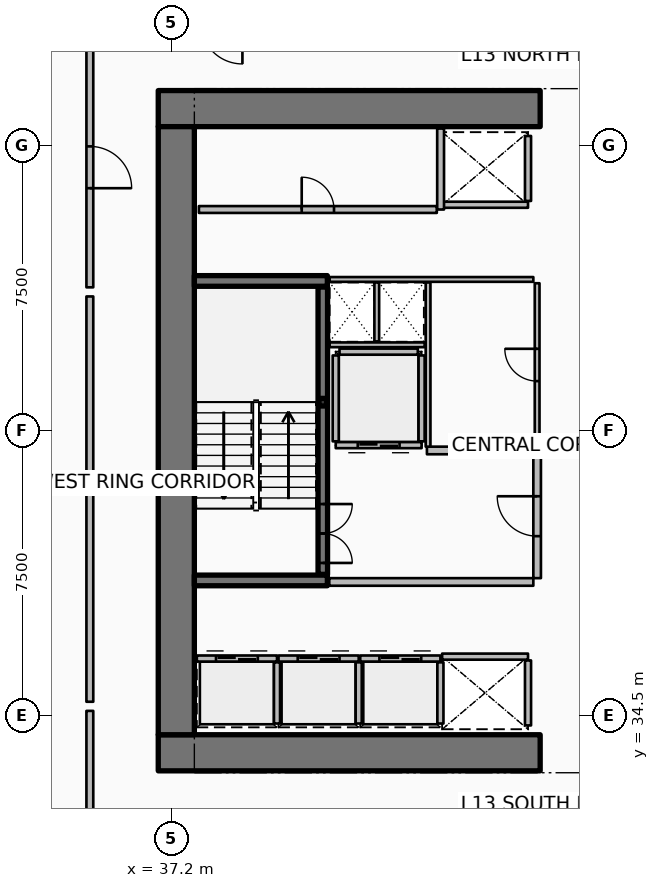
"""IFC4 building model, lengths in metres.
Left out: names, types, materials, properties, quantities, classifications, styles, units other than length and angle.
Written with IfcOpenShell. Run it as: python <this file> out.ifc"""

import sys

from ifc_helpers import new_model, si_unit, direction, frame, frame_2d, origin, origin_2d, place, context, subcontext, project, spatial, rectangle, hollow_rectangle, extrude, element, fill, save


model = new_model("IFC4")
c1 = context("Model", 3, precision=1e-05, world=origin(), true_north=direction((0.0, 1.0)))
c2 = subcontext(c1, "Body", "Model", "MODEL_VIEW")
j1 = project(units=[si_unit("LENGTHUNIT", "METRE"), si_unit("PLANEANGLEUNIT", "RADIAN")], contexts=[c1])
p1 = place(None, origin())
s1 = spatial("IfcSite", under=j1, at=p1, CompositionType="ELEMENT")
p2 = place(p1, origin())
s2 = spatial("IfcBuilding", under=s1, at=p2, CompositionType="ELEMENT")
p3 = place(p2, frame((0.0, 0.0, 56.4)))
s3 = spatial("IfcBuildingStorey", under=s2, at=p3, CompositionType="ELEMENT", Elevation=56.4)
for number, where, z_axis, x_axis in (
    (1, (36.85, 33.525, 0.0), (0.0, 0.0, 1.0), (1.0, 0.0, 0.0)),
    (2, (36.85, 50.475, 0.0), (0.0, 0.0, 1.0), (1.0, 0.0, 0.0)),
):
    element("IfcWall", number, at=place(p3, frame(where, z_axis=z_axis, x_axis=x_axis)), inside=s3, PredefinedType="SHEAR", context=c2, shape_type="SweptSolid", body=[
        extrude(rectangle(XDim=10.05, YDim=0.95, at=frame_2d((5.025, 0.0))), origin(), (0.0, 0.0, 1.0), 3.75),
    ])
p4 = place(p3, frame((37.325, 34.0, 0.0), z_axis=(0.0, 0.0, 1.0), x_axis=(0.0, 1.0, 0.0)))
e3 = element("IfcWall", 3, at=p4, inside=s3, PredefinedType="SHEAR", context=c2, shape_type="SweptSolid", body=[
    extrude(rectangle(XDim=16.0, YDim=0.95, at=frame_2d((8.0, 0.0))), origin(), (0.0, 0.0, 1.0), 3.75),
])
for number, where, z_axis, x_axis in (
    (4, (37.8, 38.06, 0.0), (0.0, 0.0, 1.0), (1.0, 0.0, 0.0)),
    (5, (37.8, 45.94, 0.0), (0.0, 0.0, 1.0), (1.0, 0.0, 0.0)),
):
    element("IfcWall", number, at=place(p3, frame(where, z_axis=z_axis, x_axis=x_axis)), inside=s3, PredefinedType="SHEAR", context=c2, shape_type="SweptSolid", body=[
        extrude(rectangle(XDim=3.5, YDim=0.28, at=frame_2d((1.75, 0.0))), origin(), (0.0, 0.0, 1.0), 3.75),
    ])
p5 = place(p3, frame((41.18, 42.75, 0.0), z_axis=(0.0, 0.0, 1.0), x_axis=(1.0, 0.0, 0.0)))
e6 = element("IfcColumn", 6, at=p5, inside=s3, PredefinedType="COLUMN", context=c2, shape_type="SweptSolid", body=[
    extrude(hollow_rectangle(XDim=0.2, YDim=0.2, WallThickness=0.01, InnerFilletRadius=0.01, OuterFilletRadius=0.02, at=origin_2d()), origin(), (0.0, 0.0, 1.0), 1.67),
])
p6 = place(p3, frame((41.18, 38.22, 0.0), z_axis=(0.0, 0.0, 1.0), x_axis=(0.0, 1.0, 0.0)))
e7 = element("IfcWall", 7, at=p6, inside=s3, PredefinedType="SOLIDWALL", context=c2, shape_type="SweptSolid", body=[
    extrude(rectangle(XDim=7.56, YDim=0.25, at=frame_2d((3.78, 0.0))), origin(), (0.0, 0.0, 1.0), 3.5),
])
p7 = place(p6, frame((0.3, 0.0, 0.0)))
e8 = element("IfcOpeningElement", 8, at=p7, cuts=e7, PredefinedType="OPENING", context=c2, shape_type="SweptSolid", body=[
    extrude(rectangle(XDim=1.55, YDim=2.15, at=frame_2d((0.775, 1.075))), frame((0.0, 0.135, 0.0), z_axis=(0.0, -1.0, 0.0), x_axis=(1.0, 0.0, 0.0)), (0.0, 0.0, 1.0), 0.27),
])
p8 = place(p3, frame((37.865, 36.005, 0.0), z_axis=(0.0, 0.0, 1.0), x_axis=(1.0, 0.0, 0.0)))
e9 = element("IfcWall", 9, at=p8, inside=s3, PredefinedType="PARTITIONING", context=c2, shape_type="SweptSolid", body=[
    extrude(rectangle(XDim=2.11, YDim=0.16, at=frame_2d((1.055, 0.0))), origin(), (0.0, 0.0, 1.0), 3.5),
])
p9 = place(p8, frame((0.505, 0.0, 0.0)))
e10 = element("IfcOpeningElement", 10, at=p9, cuts=e9, PredefinedType="OPENING", context=c2, shape_type="SweptSolid", body=[
    extrude(rectangle(XDim=1.1, YDim=2.1, at=frame_2d((0.55, 1.05))), frame((0.0, 0.09, 0.0), z_axis=(0.0, -1.0, 0.0), x_axis=(1.0, 0.0, 0.0)), (0.0, 0.0, 1.0), 0.18),
])
p10 = place(p3, frame((39.975, 34.295, 0.0), z_axis=(0.0, 0.0, 1.0), x_axis=(0.0, 1.0, 0.0)))
e11 = element("IfcWall", 11, at=p10, inside=s3, PredefinedType="PARTITIONING", context=c2, shape_type="SweptSolid", body=[
    extrude(rectangle(XDim=1.61, YDim=0.16, at=frame_2d((0.805, 0.0))), origin(), (0.0, 0.0, 1.0), 3.5),
])
p11 = place(p3, frame((40.015, 36.005, 0.0), z_axis=(0.0, 0.0, 1.0), x_axis=(1.0, 0.0, 0.0)))
e12 = element("IfcWall", 12, at=p11, inside=s3, PredefinedType="PARTITIONING", context=c2, shape_type="SweptSolid", body=[
    extrude(rectangle(XDim=2.11, YDim=0.16, at=frame_2d((1.055, 0.0))), origin(), (0.0, 0.0, 1.0), 3.5),
])
p12 = place(p11, frame((0.505, 0.0, 0.0)))
e13 = element("IfcOpeningElement", 13, at=p12, cuts=e12, PredefinedType="OPENING", context=c2, shape_type="SweptSolid", body=[
    extrude(rectangle(XDim=1.1, YDim=2.1, at=frame_2d((0.55, 1.05))), frame((0.0, 0.09, 0.0), z_axis=(0.0, -1.0, 0.0), x_axis=(1.0, 0.0, 0.0)), (0.0, 0.0, 1.0), 0.18),
])
p13 = place(p3, frame((42.125, 34.295, 0.0), z_axis=(0.0, 0.0, 1.0), x_axis=(0.0, 1.0, 0.0)))
e14 = element("IfcWall", 14, at=p13, inside=s3, PredefinedType="PARTITIONING", context=c2, shape_type="SweptSolid", body=[
    extrude(rectangle(XDim=1.61, YDim=0.16, at=frame_2d((0.805, 0.0))), origin(), (0.0, 0.0, 1.0), 3.5),
])
p14 = place(p3, frame((42.165, 36.005, 0.0), z_axis=(0.0, 0.0, 1.0), x_axis=(1.0, 0.0, 0.0)))
e15 = element("IfcWall", 15, at=p14, inside=s3, PredefinedType="PARTITIONING", context=c2, shape_type="SweptSolid", body=[
    extrude(rectangle(XDim=2.11, YDim=0.16, at=frame_2d((1.055, 0.0))), origin(), (0.0, 0.0, 1.0), 3.5),
])
p15 = place(p14, frame((0.505, 0.0, 0.0)))
e16 = element("IfcOpeningElement", 16, at=p15, cuts=e15, PredefinedType="OPENING", context=c2, shape_type="SweptSolid", body=[
    extrude(rectangle(XDim=1.1, YDim=2.1, at=frame_2d((0.55, 1.05))), frame((0.0, 0.09, 0.0), z_axis=(0.0, -1.0, 0.0), x_axis=(1.0, 0.0, 0.0)), (0.0, 0.0, 1.0), 0.18),
])
p16 = place(p3, frame((44.275, 34.295, 0.0), z_axis=(0.0, 0.0, 1.0), x_axis=(0.0, 1.0, 0.0)))
e17 = element("IfcWall", 17, at=p16, inside=s3, PredefinedType="PARTITIONING", context=c2, shape_type="SweptSolid", body=[
    extrude(rectangle(XDim=1.61, YDim=0.16, at=frame_2d((0.805, 0.0))), origin(), (0.0, 0.0, 1.0), 3.5),
])
p17 = place(p3, frame((46.58, 47.945, 0.0), z_axis=(0.0, 0.0, 1.0), x_axis=(-1.0, 0.0, 0.0)))
e18 = element("IfcWall", 18, at=p17, inside=s3, PredefinedType="PARTITIONING", context=c2, shape_type="SweptSolid", body=[
    extrude(rectangle(XDim=2.26, YDim=0.16, at=frame_2d((1.13, 0.0))), origin(), (0.0, 0.0, 1.0), 3.5),
])
p18 = place(p3, frame((46.58, 48.045, 0.0), z_axis=(0.0, 0.0, 1.0), x_axis=(0.0, 1.0, 0.0)))
e19 = element("IfcWall", 19, at=p18, inside=s3, PredefinedType="PARTITIONING", context=c2, shape_type="SweptSolid", body=[
    extrude(rectangle(XDim=1.71, YDim=0.16, at=frame_2d((0.855, 0.0))), origin(), (0.0, 0.0, 1.0), 3.5),
])
p19 = place(p3, frame((44.32, 36.055, 0.0), z_axis=(0.0, 0.0, 1.0), x_axis=(1.0, 0.0, 0.0)))
e20 = element("IfcWall", 20, at=p19, inside=s3, PredefinedType="PARTITIONING", context=c2, shape_type="SweptSolid", body=[
    extrude(rectangle(XDim=2.26, YDim=0.16, at=frame_2d((1.13, 0.0))), origin(), (0.0, 0.0, 1.0), 3.5),
])
p20 = place(p3, frame((46.58, 34.245, 0.0), z_axis=(0.0, 0.0, 1.0), x_axis=(0.0, 1.0, 0.0)))
e21 = element("IfcWall", 21, at=p20, inside=s3, PredefinedType="PARTITIONING", context=c2, shape_type="SweptSolid", body=[
    extrude(rectangle(XDim=1.71, YDim=0.16, at=frame_2d((0.855, 0.0))), origin(), (0.0, 0.0, 1.0), 3.5),
])
p21 = place(p3, frame((43.78, 41.62, 0.0), z_axis=(0.0, 0.0, 1.0), x_axis=(-1.0, 0.0, 0.0)))
e22 = element("IfcWall", 22, at=p21, inside=s3, PredefinedType="PARTITIONING", context=c2, shape_type="SweptSolid", body=[
    extrude(rectangle(XDim=2.26, YDim=0.16, at=frame_2d((1.13, 0.0))), origin(), (0.0, 0.0, 1.0), 3.5),
])
p22 = place(p21, frame((0.58, 0.0, 0.0)))
e23 = element("IfcOpeningElement", 23, at=p22, cuts=e22, PredefinedType="OPENING", context=c2, shape_type="SweptSolid", body=[
    extrude(rectangle(XDim=1.1, YDim=2.1, at=frame_2d((0.55, 1.05))), frame((0.0, 0.09, 0.0), z_axis=(0.0, -1.0, 0.0), x_axis=(1.0, 0.0, 0.0)), (0.0, 0.0, 1.0), 0.18),
])
for number, where, z_axis, x_axis in (
    (24, (43.78, 41.72, 0.0), (0.0, 0.0, 1.0), (0.0, 1.0, 0.0)),
    (25, (41.52, 41.72, 0.0), (0.0, 0.0, 1.0), (0.0, 1.0, 0.0)),
):
    element("IfcWall", number, at=place(p3, frame(where, z_axis=z_axis, x_axis=x_axis)), inside=s3, PredefinedType="PARTITIONING", context=c2, shape_type="SweptSolid", body=[
        extrude(rectangle(XDim=2.26, YDim=0.16, at=frame_2d((1.13, 0.0))), origin(), (0.0, 0.0, 1.0), 3.5),
    ])
p23 = place(p3, frame((41.62, 44.08, 0.0), z_axis=(0.0, 0.0, 1.0), x_axis=(1.0, 0.0, 0.0)))
e26 = element("IfcWall", 26, at=p23, inside=s3, PredefinedType="PARTITIONING", context=c2, shape_type="SweptSolid", body=[
    extrude(rectangle(XDim=2.06, YDim=0.16, at=frame_2d((1.03, 0.0))), origin(), (0.0, 0.0, 1.0), 3.5),
])
p24 = place(p3, frame((37.92, 47.82, 0.0), z_axis=(0.0, 0.0, 1.0), x_axis=(1.0, 0.0, 0.0)))
e27 = element("IfcWall", 27, at=p24, inside=s3, PredefinedType="PARTITIONING", context=c2, shape_type="SweptSolid", body=[
    extrude(rectangle(XDim=6.26, YDim=0.18, at=frame_2d((3.13, 0.0))), origin(), (0.0, 0.0, 1.0), 3.5),
])
p25 = place(p24, frame((2.705, 0.0, 0.0)))
e28 = element("IfcOpeningElement", 28, at=p25, cuts=e27, PredefinedType="OPENING", context=c2, shape_type="SweptSolid", body=[
    extrude(rectangle(XDim=0.85, YDim=2.06, at=frame_2d((0.425, 1.03))), frame((0.0, 0.1, 0.0), z_axis=(0.0, -1.0, 0.0), x_axis=(1.0, 0.0, 0.0)), (0.0, 0.0, 1.0), 0.2),
])
p26 = place(p3, frame((44.28, 47.82, 0.0), z_axis=(0.0, 0.0, 1.0), x_axis=(0.0, 1.0, 0.0)))
e29 = element("IfcWall", 29, at=p26, inside=s3, PredefinedType="PARTITIONING", context=c2, shape_type="SweptSolid", body=[
    extrude(rectangle(XDim=2.13, YDim=0.18, at=frame_2d((1.065, 0.0))), origin(), (0.0, 0.0, 1.0), 3.5),
])
p27 = place(p3, frame((41.35, 38.02, 0.0), z_axis=(0.0, 0.0, 1.0), x_axis=(1.0, 0.0, 0.0)))
e30 = element("IfcWall", 30, at=p27, inside=s3, PredefinedType="PARTITIONING", context=c2, shape_type="SweptSolid", body=[
    extrude(rectangle(XDim=5.37, YDim=0.2, at=frame_2d((2.685, 0.0))), origin(), (0.0, 0.0, 1.0), 3.5),
])
p28 = place(p3, frame((43.92, 41.48, 0.0), z_axis=(0.0, 0.0, 1.0), x_axis=(1.0, 0.0, 0.0)))
e31 = element("IfcWall", 31, at=p28, inside=s3, PredefinedType="PARTITIONING", context=c2, shape_type="SweptSolid", body=[
    extrude(rectangle(XDim=2.8, YDim=0.2, at=frame_2d((1.4, 0.0))), origin(), (0.0, 0.0, 1.0), 3.5),
])
p29 = place(p3, frame((46.82, 38.12, 0.0), z_axis=(0.0, 0.0, 1.0), x_axis=(0.0, 1.0, 0.0)))
e32 = element("IfcWall", 32, at=p29, inside=s3, PredefinedType="PARTITIONING", context=c2, shape_type="SweptSolid", body=[
    extrude(rectangle(XDim=3.26, YDim=0.2, at=frame_2d((1.63, 0.0))), origin(), (0.0, 0.0, 1.0), 3.5),
])
p30 = place(p29, frame((1.105, 0.0, 0.0)))
e33 = element("IfcOpeningElement", 33, at=p30, cuts=e32, PredefinedType="OPENING", context=c2, shape_type="SweptSolid", body=[
    extrude(rectangle(XDim=1.05, YDim=2.1, at=frame_2d((0.525, 1.05))), frame((0.0, 0.11, 0.0), z_axis=(0.0, -1.0, 0.0), x_axis=(1.0, 0.0, 0.0)), (0.0, 0.0, 1.0), 0.22),
])
p31 = place(p3, frame((41.36, 45.98, 0.0), z_axis=(0.0, 0.0, 1.0), x_axis=(1.0, 0.0, 0.0)))
e34 = element("IfcWall", 34, at=p31, inside=s3, PredefinedType="PARTITIONING", context=c2, shape_type="SweptSolid", body=[
    extrude(rectangle(XDim=5.36, YDim=0.125, at=frame_2d((2.68, 0.0))), origin(), (0.0, 0.0, 1.0), 2.94),
])
p32 = place(p3, frame((41.36, 44.26, 0.0), z_axis=(0.0, 0.0, 1.0), x_axis=(1.0, 0.0, 0.0)))
e35 = element("IfcWall", 35, at=p32, inside=s3, PredefinedType="PARTITIONING", context=c2, shape_type="SweptSolid", body=[
    extrude(rectangle(XDim=2.5, YDim=0.125, at=frame_2d((1.25, 0.0))), origin(), (0.0, 0.0, 1.0), 2.94),
])
p33 = place(p3, frame((42.6, 44.35, 0.0), z_axis=(0.0, 0.0, 1.0), x_axis=(0.0, 1.0, 0.0)))
e36 = element("IfcWall", 36, at=p33, inside=s3, PredefinedType="PARTITIONING", context=c2, shape_type="SweptSolid", body=[
    extrude(rectangle(XDim=1.55, YDim=0.125, at=frame_2d((0.775, 0.0))), origin(), (0.0, 0.0, 1.0), 2.94),
])
p34 = place(p3, frame((43.95, 41.58, 0.0), z_axis=(0.0, 0.0, 1.0), x_axis=(0.0, 1.0, 0.0)))
e37 = element("IfcWall", 37, at=p34, inside=s3, PredefinedType="PARTITIONING", context=c2, shape_type="SweptSolid", body=[
    extrude(rectangle(XDim=4.32, YDim=0.125, at=frame_2d((2.16, 0.0))), origin(), (0.0, 0.0, 1.0), 2.94),
])
p35 = place(p3, frame((46.82, 41.58, 0.0), z_axis=(0.0, 0.0, 1.0), x_axis=(0.0, 1.0, 0.0)))
e38 = element("IfcWall", 38, at=p35, inside=s3, PredefinedType="PARTITIONING", context=c2, shape_type="SweptSolid", body=[
    extrude(rectangle(XDim=4.3, YDim=0.125, at=frame_2d((2.15, 0.0))), origin(), (0.0, 0.0, 1.0), 2.94),
])
p36 = place(p35, frame((1.725, 0.0, 0.0)))
e39 = element("IfcOpeningElement", 39, at=p36, cuts=e38, PredefinedType="OPENING", context=c2, shape_type="SweptSolid", body=[
    extrude(rectangle(XDim=0.85, YDim=2.06, at=frame_2d((0.425, 1.03))), frame((0.0, 0.073, 0.0), z_axis=(0.0, -1.0, 0.0), x_axis=(1.0, 0.0, 0.0)), (0.0, 0.0, 1.0), 0.145),
])
p37 = place(p3, frame((35.05, 52.089, 0.0), z_axis=(0.0, 0.0, 1.0), x_axis=(0.0, -1.0, 0.0)))
e40 = element("IfcWall", 40, at=p37, inside=s3, PredefinedType="PARTITIONING", context=c2, shape_type="SweptSolid", body=[
    extrude(rectangle(XDim=6.317, YDim=0.18, at=frame_2d((3.158, 0.0))), origin(), (0.0, 0.0, 1.0), 2.867),
])
p38 = place(p37, frame((2.608, 0.0, 0.0)))
e41 = element("IfcOpeningElement", 41, at=p38, cuts=e40, PredefinedType="OPENING", context=c2, shape_type="SweptSolid", body=[
    extrude(rectangle(XDim=1.1, YDim=2.1, at=frame_2d((0.55, 1.05))), frame((0.0, 0.1, 0.0), z_axis=(0.0, -1.0, 0.0), x_axis=(1.0, 0.0, 0.0)), (0.0, 0.0, 1.0), 0.2),
])
p39 = place(p3, frame((35.05, 45.532, 0.0), z_axis=(0.0, 0.0, 1.0), x_axis=(0.0, -1.0, 0.0)))
e42 = element("IfcWall", 42, at=p39, inside=s3, PredefinedType="PARTITIONING", context=c2, shape_type="SweptSolid", body=[
    extrude(rectangle(XDim=4.945, YDim=0.18, at=frame_2d((2.472, 0.0))), origin(), (0.0, 0.0, 1.0), 2.867),
])
p40 = place(p3, frame((35.05, 40.347, 0.0), z_axis=(0.0, 0.0, 1.0), x_axis=(0.0, -1.0, 0.0)))
e43 = element("IfcWall", 43, at=p40, inside=s3, PredefinedType="PARTITIONING", context=c2, shape_type="SweptSolid", body=[
    extrude(rectangle(XDim=5.48, YDim=0.18, at=frame_2d((2.74, 0.0))), origin(), (0.0, 0.0, 1.0), 2.867),
])
p41 = place(p3, frame((35.05, 34.628, 0.0), z_axis=(0.0, 0.0, 1.0), x_axis=(0.0, -1.0, 0.0)))
e44 = element("IfcWall", 44, at=p41, inside=s3, PredefinedType="PARTITIONING", context=c2, shape_type="SweptSolid", body=[
    extrude(rectangle(XDim=3.258, YDim=0.18, at=frame_2d((1.629, 0.0))), origin(), (0.0, 0.0, 1.0), 2.867),
])
p42 = place(p7, origin())
e45 = element("IfcDoor", 45, at=p42, inside=s3, OperationType="DOUBLE_DOOR_SINGLE_SWING", PredefinedType="DOOR", context=c2, shape_type="SweptSolid", body=[
    extrude(rectangle(XDim=1.55, YDim=2.15, at=frame_2d((0.775, 1.075))), frame((0.0, 0.025, 0.0), z_axis=(0.0, -1.0, 0.0), x_axis=(1.0, 0.0, 0.0)), (0.0, 0.0, 1.0), 0.05),
])
fill(e8, e45)
p43 = place(p9, origin())
e46 = element("IfcDoor", 46, at=p43, inside=s3, OperationType="DOUBLE_DOOR_SLIDING", PredefinedType="DOOR", context=c2, shape_type="SweptSolid", body=[
    extrude(rectangle(XDim=1.1, YDim=2.1, at=frame_2d((0.55, 1.05))), frame((0.0, 0.025, 0.0), z_axis=(0.0, -1.0, 0.0), x_axis=(1.0, 0.0, 0.0)), (0.0, 0.0, 1.0), 0.05),
])
fill(e10, e46)
p44 = place(p12, origin())
e47 = element("IfcDoor", 47, at=p44, inside=s3, OperationType="DOUBLE_DOOR_SLIDING", PredefinedType="DOOR", context=c2, shape_type="SweptSolid", body=[
    extrude(rectangle(XDim=1.1, YDim=2.1, at=frame_2d((0.55, 1.05))), frame((0.0, 0.025, 0.0), z_axis=(0.0, -1.0, 0.0), x_axis=(1.0, 0.0, 0.0)), (0.0, 0.0, 1.0), 0.05),
])
fill(e13, e47)
p45 = place(p15, origin())
e48 = element("IfcDoor", 48, at=p45, inside=s3, OperationType="DOUBLE_DOOR_SLIDING", PredefinedType="DOOR", context=c2, shape_type="SweptSolid", body=[
    extrude(rectangle(XDim=1.1, YDim=2.1, at=frame_2d((0.55, 1.05))), frame((0.0, 0.025, 0.0), z_axis=(0.0, -1.0, 0.0), x_axis=(1.0, 0.0, 0.0)), (0.0, 0.0, 1.0), 0.05),
])
fill(e16, e48)
p46 = place(p22, origin())
e49 = element("IfcDoor", 49, at=p46, inside=s3, OperationType="DOUBLE_DOOR_SLIDING", PredefinedType="DOOR", context=c2, shape_type="SweptSolid", body=[
    extrude(rectangle(XDim=1.1, YDim=2.1, at=frame_2d((0.55, 1.05))), frame((0.0, 0.025, 0.0), z_axis=(0.0, -1.0, 0.0), x_axis=(1.0, 0.0, 0.0)), (0.0, 0.0, 1.0), 0.05),
])
fill(e23, e49)
p47 = place(p25, origin())
e50 = element("IfcDoor", 50, at=p47, inside=s3, OperationType="SINGLE_SWING_LEFT", PredefinedType="DOOR", context=c2, shape_type="SweptSolid", body=[
    extrude(rectangle(XDim=0.85, YDim=2.06, at=frame_2d((0.425, 1.03))), frame((0.0, 0.025, 0.0), z_axis=(0.0, -1.0, 0.0), x_axis=(1.0, 0.0, 0.0)), (0.0, 0.0, 1.0), 0.05),
])
fill(e28, e50)
p48 = place(p30, origin())
e51 = element("IfcDoor", 51, at=p48, inside=s3, OperationType="SINGLE_SWING_RIGHT", PredefinedType="DOOR", context=c2, shape_type="SweptSolid", body=[
    extrude(rectangle(XDim=1.05, YDim=2.1, at=frame_2d((0.525, 1.05))), frame((0.0, 0.025, 0.0), z_axis=(0.0, -1.0, 0.0), x_axis=(1.0, 0.0, 0.0)), (0.0, 0.0, 1.0), 0.05),
])
fill(e33, e51)
p49 = place(p36, origin())
e52 = element("IfcDoor", 52, at=p49, inside=s3, OperationType="SINGLE_SWING_RIGHT", PredefinedType="DOOR", context=c2, shape_type="SweptSolid", body=[
    extrude(rectangle(XDim=0.85, YDim=2.06, at=frame_2d((0.425, 1.03))), frame((0.0, 0.025, 0.0), z_axis=(0.0, -1.0, 0.0), x_axis=(1.0, 0.0, 0.0)), (0.0, 0.0, 1.0), 0.05),
])
fill(e39, e52)
p50 = place(p38, origin())
e53 = element("IfcDoor", 53, at=p50, inside=s3, OperationType="SINGLE_SWING_RIGHT", PredefinedType="DOOR", context=c2, shape_type="SweptSolid", body=[
    extrude(rectangle(XDim=1.1, YDim=2.1, at=frame_2d((0.55, 1.05))), frame((0.0, 0.025, 0.0), z_axis=(0.0, -1.0, 0.0), x_axis=(1.0, 0.0, 0.0)), (0.0, 0.0, 1.0), 0.05),
])
fill(e41, e53)
save(model, sys.argv[1])
